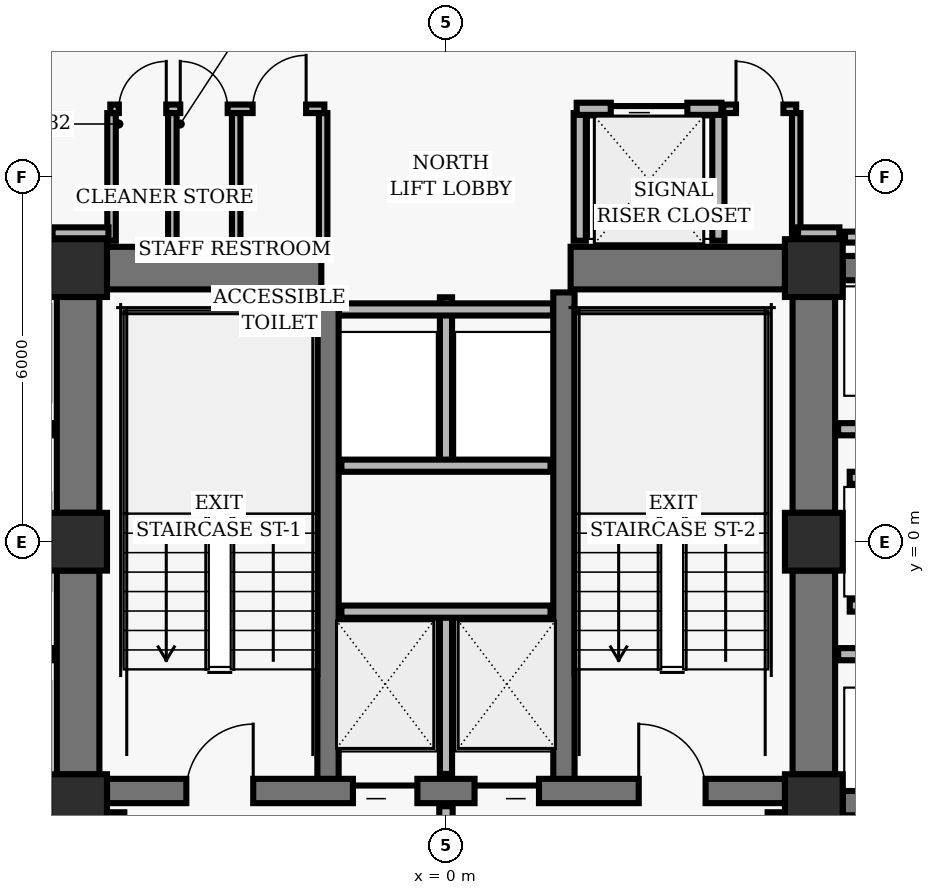
"""IFC4 building model, lengths in metres.
Left out: names, types, materials, properties, quantities, classifications, styles, units other than length and angle.
Written with IfcOpenShell. Run it as: python <this file> out.ifc"""

import sys

from ifc_helpers import new_model, si_unit, direction, frame, frame_2d, origin, origin_2d, place, context, subcontext, project, spatial, rectangle, hollow_rectangle, extrude, element, fill, save


model = new_model("IFC4")
c1 = context("Model", 3, precision=1e-05, world=origin(), true_north=direction((0.0, 1.0)))
c2 = subcontext(c1, "Body", "Model", "MODEL_VIEW")
j1 = project(units=[si_unit("LENGTHUNIT", "METRE"), si_unit("PLANEANGLEUNIT", "RADIAN")], contexts=[c1])
p1 = place(None, origin())
s1 = spatial("IfcSite", under=j1, at=p1, CompositionType="ELEMENT")
p2 = place(p1, origin())
s2 = spatial("IfcBuilding", under=s1, at=p2, CompositionType="ELEMENT")
p3 = place(p2, frame((0.0, 0.0, 88.64)))
s3 = spatial("IfcBuildingStorey", under=s2, at=p3, CompositionType="ELEMENT", Elevation=88.64)
for number, where, z_axis, x_axis in (
    (1, (-6.05, 4.5, 0.0), (0.0, 0.0, 1.0), (1.0, 0.0, 0.0)),
    (2, (6.05, 4.5, 0.0), (0.0, 0.0, 1.0), (1.0, 0.0, 0.0)),
    (3, (-6.05, 0.0, 0.0), (0.0, 0.0, 1.0), (1.0, 0.0, 0.0)),
    (4, (6.05, 0.0, 0.0), (0.0, 0.0, 1.0), (1.0, 0.0, 0.0)),
    (5, (-6.05, -4.3, 0.0), (0.0, 0.0, 1.0), (1.0, 0.0, 0.0)),
    (6, (6.05, -4.3, 0.0), (0.0, 0.0, 1.0), (1.0, 0.0, 0.0)),
):
    element("IfcColumn", number, at=place(p3, frame(where, z_axis=z_axis, x_axis=x_axis)), inside=s3, PredefinedType="COLUMN", context=c2, shape_type="SweptSolid", body=[
        extrude(hollow_rectangle(XDim=0.95, YDim=0.95, WallThickness=0.06, InnerFilletRadius=0.02, OuterFilletRadius=0.04, at=origin_2d()), origin(), (0.0, 0.0, 1.0), 3.04),
    ])
p4 = place(p3, frame((-6.05, 0.475, 0.0), z_axis=(0.0, 0.0, 1.0), x_axis=(0.0, 1.0, 0.0)))
e7 = element("IfcWall", 7, at=p4, inside=s3, PredefinedType="SHEAR", context=c2, shape_type="SweptSolid", body=[
    extrude(rectangle(XDim=3.55, YDim=0.7, at=frame_2d((1.775, 0.0))), origin(), (0.0, 0.0, 1.0), 2.788),
])
p5 = place(p3, frame((-6.05, -3.825, 0.0), z_axis=(0.0, 0.0, 1.0), x_axis=(0.0, 1.0, 0.0)))
e8 = element("IfcWall", 8, at=p5, inside=s3, PredefinedType="SHEAR", context=c2, shape_type="SweptSolid", body=[
    extrude(rectangle(XDim=3.35, YDim=0.7, at=frame_2d((1.675, 0.0))), origin(), (0.0, 0.0, 1.0), 2.788),
])
p6 = place(p3, frame((6.05, 0.475, 0.0), z_axis=(0.0, 0.0, 1.0), x_axis=(0.0, 1.0, 0.0)))
e9 = element("IfcWall", 9, at=p6, inside=s3, PredefinedType="SHEAR", context=c2, shape_type="SweptSolid", body=[
    extrude(rectangle(XDim=3.55, YDim=0.7, at=frame_2d((1.775, 0.0))), origin(), (0.0, 0.0, 1.0), 2.788),
])
p7 = place(p3, frame((6.05, -3.825, 0.0), z_axis=(0.0, 0.0, 1.0), x_axis=(0.0, 1.0, 0.0)))
e10 = element("IfcWall", 10, at=p7, inside=s3, PredefinedType="SHEAR", context=c2, shape_type="SweptSolid", body=[
    extrude(rectangle(XDim=3.35, YDim=0.7, at=frame_2d((1.675, 0.0))), origin(), (0.0, 0.0, 1.0), 2.788),
])
for number, where, z_axis, x_axis in (
    (11, (-1.94, -4.1, 0.0), (0.0, 0.0, 1.0), (0.0, 1.0, 0.0)),
    (12, (1.94, -4.1, 0.0), (0.0, 0.0, 1.0), (0.0, 1.0, 0.0)),
):
    element("IfcWall", number, at=place(p3, frame(where, z_axis=z_axis, x_axis=x_axis)), inside=s3, PredefinedType="SHEAR", context=c2, shape_type="SweptSolid", body=[
        extrude(rectangle(XDim=8.2, YDim=0.35, at=frame_2d((4.1, 0.0))), origin(), (0.0, 0.0, 1.0), 2.788),
    ])
p8 = place(p3, frame((-5.575, -4.1, 0.0), z_axis=(0.0, 0.0, 1.0), x_axis=(1.0, 0.0, 0.0)))
e13 = element("IfcWall", 13, at=p8, inside=s3, PredefinedType="SHEAR", context=c2, shape_type="SweptSolid", body=[
    extrude(rectangle(XDim=11.15, YDim=0.4, at=frame_2d((5.575, 0.0))), origin(), (0.0, 0.0, 1.0), 2.788),
])
p9 = place(p8, frame((1.305, 0.0, 0.0)))
e14 = element("IfcOpeningElement", 14, at=p9, cuts=e13, PredefinedType="OPENING", context=c2, shape_type="SweptSolid", body=[
    extrude(rectangle(XDim=1.1, YDim=2.04, at=frame_2d((0.55, 1.02))), frame((0.0, 0.21, 0.0), z_axis=(0.0, -1.0, 0.0), x_axis=(1.0, 0.0, 0.0)), (0.0, 0.0, 1.0), 0.42),
])
p10 = place(p8, frame((8.745, 0.0, 0.0)))
e15 = element("IfcOpeningElement", 15, at=p10, cuts=e13, PredefinedType="OPENING", context=c2, shape_type="SweptSolid", body=[
    extrude(rectangle(XDim=1.1, YDim=2.04, at=frame_2d((0.55, 1.02))), frame((0.0, 0.21, 0.0), z_axis=(0.0, -1.0, 0.0), x_axis=(1.0, 0.0, 0.0)), (0.0, 0.0, 1.0), 0.42),
])
p11 = place(p8, frame((4.045, 0.0, 0.0)))
e16 = element("IfcOpeningElement", 16, at=p11, cuts=e13, PredefinedType="OPENING", context=c2, shape_type="SweptSolid", body=[
    extrude(rectangle(XDim=1.06, YDim=2.04, at=frame_2d((0.53, 1.02))), frame((0.0, 0.21, 0.0), z_axis=(0.0, -1.0, 0.0), x_axis=(1.0, 0.0, 0.0)), (0.0, 0.0, 1.0), 0.42),
])
p12 = place(p8, frame((6.045, 0.0, 0.0)))
e17 = element("IfcOpeningElement", 17, at=p12, cuts=e13, PredefinedType="OPENING", context=c2, shape_type="SweptSolid", body=[
    extrude(rectangle(XDim=1.06, YDim=2.04, at=frame_2d((0.53, 1.02))), frame((0.0, 0.21, 0.0), z_axis=(0.0, -1.0, 0.0), x_axis=(1.0, 0.0, 0.0)), (0.0, 0.0, 1.0), 0.42),
])
for number, where, z_axis, x_axis in (
    (18, (-5.575, 4.5, 0.0), (0.0, 0.0, 1.0), (1.0, 0.0, 0.0)),
    (19, (2.05, 4.5, 0.0), (0.0, 0.0, 1.0), (1.0, 0.0, 0.0)),
):
    element("IfcWall", number, at=place(p3, frame(where, z_axis=z_axis, x_axis=x_axis)), inside=s3, PredefinedType="SHEAR", context=c2, shape_type="SweptSolid", body=[
        extrude(rectangle(XDim=3.525, YDim=0.7, at=frame_2d((1.762, 0.0))), origin(), (0.0, 0.0, 1.0), 2.788),
    ])
for number, where, z_axis, x_axis in (
    (20, (6.525, 4.5, 0.0), (0.0, 0.0, 1.0), (1.0, 0.0, 0.0)),
    (21, (6.525, -4.3, 0.0), (0.0, 0.0, 1.0), (1.0, 0.0, 0.0)),
):
    element("IfcWall", number, at=place(p3, frame(where, z_axis=z_axis, x_axis=x_axis)), inside=s3, PredefinedType="SHEAR", context=c2, shape_type="SweptSolid", body=[
        extrude(rectangle(XDim=1.95, YDim=0.4, at=frame_2d((0.975, 0.0))), origin(), (0.0, 0.0, 1.0), 2.788),
    ])
p13 = place(p3, frame((0.0, -3.82, 0.0), z_axis=(0.0, 0.0, 1.0), x_axis=(0.0, 1.0, 0.0)))
e22 = element("IfcWall", 22, at=p13, inside=s3, PredefinedType="PARTITIONING", context=c2, shape_type="SweptSolid", body=[
    extrude(rectangle(XDim=2.67, YDim=0.2, at=frame_2d((1.335, 0.0))), origin(), (0.0, 0.0, 1.0), 2.763),
])
p14 = place(p3, frame((-1.72, -1.15, 0.0), z_axis=(0.0, 0.0, 1.0), x_axis=(1.0, 0.0, 0.0)))
e23 = element("IfcWall", 23, at=p14, inside=s3, PredefinedType="PARTITIONING", context=c2, shape_type="SweptSolid", body=[
    extrude(rectangle(XDim=3.44, YDim=0.2, at=frame_2d((1.72, 0.0))), origin(), (0.0, 0.0, 1.0), 2.763),
])
for number, where, z_axis, x_axis in (
    (24, (-5.4, -7.16, 0.0), (0.0, 0.0, 1.0), (0.0, 1.0, 0.0)),
    (25, (5.4, -7.16, 0.0), (0.0, 0.0, 1.0), (0.0, 1.0, 0.0)),
):
    element("IfcWall", number, at=place(p3, frame(where, z_axis=z_axis, x_axis=x_axis)), inside=s3, PredefinedType="PARTITIONING", context=c2, shape_type="SweptSolid", body=[
        extrude(rectangle(XDim=2.71, YDim=0.22, at=frame_2d((1.355, 0.0))), origin(), (0.0, 0.0, 1.0), 2.763),
    ])
p15 = place(p3, frame((0.0, -7.16, 0.0), z_axis=(0.0, 0.0, 1.0), x_axis=(0.0, 1.0, 0.0)))
e26 = element("IfcWall", 26, at=p15, inside=s3, PredefinedType="PARTITIONING", context=c2, shape_type="SweptSolid", body=[
    extrude(rectangle(XDim=2.81, YDim=0.22, at=frame_2d((1.405, 0.0))), origin(), (0.0, 0.0, 1.0), 2.763),
])
p16 = place(p3, frame((0.0, 1.25, 0.0), z_axis=(0.0, 0.0, 1.0), x_axis=(0.0, 1.0, 0.0)))
e27 = element("IfcWall", 27, at=p16, inside=s3, PredefinedType="PARTITIONING", context=c2, shape_type="SweptSolid", body=[
    extrude(rectangle(XDim=2.77, YDim=0.2, at=frame_2d((1.385, 0.0))), origin(), (0.0, 0.0, 1.0), 2.763),
])
p17 = place(p3, frame((-1.72, 1.25, 0.0), z_axis=(0.0, 0.0, 1.0), x_axis=(1.0, 0.0, 0.0)))
e28 = element("IfcWall", 28, at=p17, inside=s3, PredefinedType="PARTITIONING", context=c2, shape_type="SweptSolid", body=[
    extrude(rectangle(XDim=3.44, YDim=0.2, at=frame_2d((1.72, 0.0))), origin(), (0.0, 0.0, 1.0), 2.763),
])
p18 = place(p3, frame((-1.76, 3.82, 0.0), z_axis=(0.0, 0.0, 1.0), x_axis=(1.0, 0.0, 0.0)))
e29 = element("IfcWall", 29, at=p18, inside=s3, PredefinedType="PARTITIONING", context=c2, shape_type="SweptSolid", body=[
    extrude(rectangle(XDim=3.52, YDim=0.2, at=frame_2d((1.76, 0.0))), origin(), (0.0, 0.0, 1.0), 2.763),
])
for number, where, z_axis, x_axis in (
    (30, (2.2, 4.95, 0.0), (0.0, 0.0, 1.0), (0.0, 1.0, 0.0)),
    (31, (4.48, 4.95, 0.0), (0.0, 0.0, 1.0), (0.0, 1.0, 0.0)),
):
    element("IfcWall", number, at=place(p3, frame(where, z_axis=z_axis, x_axis=x_axis)), inside=s3, PredefinedType="PARTITIONING", context=c2, shape_type="SweptSolid", body=[
        extrude(rectangle(XDim=2.1, YDim=0.2, at=frame_2d((1.05, 0.0))), origin(), (0.0, 0.0, 1.0), 2.763),
    ])
p19 = place(p3, frame((2.15, 7.12, 0.0), z_axis=(0.0, 0.0, 1.0), x_axis=(1.0, 0.0, 0.0)))
e32 = element("IfcWall", 32, at=p19, inside=s3, PredefinedType="PARTITIONING", context=c2, shape_type="SweptSolid", body=[
    extrude(rectangle(XDim=2.38, YDim=0.2, at=frame_2d((1.19, 0.0))), origin(), (0.0, 0.0, 1.0), 2.763),
])
p20 = place(p19, frame((0.56, 0.0, 0.0)))
e33 = element("IfcOpeningElement", 33, at=p20, cuts=e32, PredefinedType="OPENING", context=c2, shape_type="SweptSolid", body=[
    extrude(rectangle(XDim=1.26, YDim=2.06, at=frame_2d((0.63, 1.03))), frame((0.0, 0.11, 0.0), z_axis=(0.0, -1.0, 0.0), x_axis=(1.0, 0.0, 0.0)), (0.0, 0.0, 1.0), 0.22),
])
for number, where, z_axis, x_axis in (
    (34, (-5.5, 4.95, 0.0), (0.0, 0.0, 1.0), (0.0, 1.0, 0.0)),
    (35, (-4.5, 4.95, 0.0), (0.0, 0.0, 1.0), (0.0, 1.0, 0.0)),
    (36, (-3.45, 4.95, 0.0), (0.0, 0.0, 1.0), (0.0, 1.0, 0.0)),
    (37, (-2.02, 4.95, 0.0), (0.0, 0.0, 1.0), (0.0, 1.0, 0.0)),
):
    element("IfcWall", number, at=place(p3, frame(where, z_axis=z_axis, x_axis=x_axis)), inside=s3, PredefinedType="PARTITIONING", context=c2, shape_type="SweptSolid", body=[
        extrude(rectangle(XDim=2.1, YDim=0.14, at=frame_2d((1.05, 0.0))), origin(), (0.0, 0.0, 1.0), 2.763),
    ])
p21 = place(p3, frame((-5.52, 7.12, 0.0), z_axis=(0.0, 0.0, 1.0), x_axis=(1.0, 0.0, 0.0)))
e38 = element("IfcWall", 38, at=p21, inside=s3, PredefinedType="PARTITIONING", context=c2, shape_type="SweptSolid", body=[
    extrude(rectangle(XDim=3.52, YDim=0.14, at=frame_2d((1.76, 0.0))), origin(), (0.0, 0.0, 1.0), 2.763),
])
p22 = place(p21, frame((0.14, 0.0, 0.0)))
e39 = element("IfcOpeningElement", 39, at=p22, cuts=e38, PredefinedType="OPENING", context=c2, shape_type="SweptSolid", body=[
    extrude(rectangle(XDim=0.78, YDim=2.01, at=frame_2d((0.39, 1.005))), frame((0.0, 0.08, 0.0), z_axis=(0.0, -1.0, 0.0), x_axis=(1.0, 0.0, 0.0)), (0.0, 0.0, 1.0), 0.16),
])
p23 = place(p21, frame((1.15, 0.0, 0.0)))
e40 = element("IfcOpeningElement", 40, at=p23, cuts=e38, PredefinedType="OPENING", context=c2, shape_type="SweptSolid", body=[
    extrude(rectangle(XDim=0.78, YDim=2.01, at=frame_2d((0.39, 1.005))), frame((0.0, 0.08, 0.0), z_axis=(0.0, -1.0, 0.0), x_axis=(1.0, 0.0, 0.0)), (0.0, 0.0, 1.0), 0.16),
])
p24 = place(p21, frame((2.34, 0.0, 0.0)))
e41 = element("IfcOpeningElement", 41, at=p24, cuts=e38, PredefinedType="OPENING", context=c2, shape_type="SweptSolid", body=[
    extrude(rectangle(XDim=0.88, YDim=2.02, at=frame_2d((0.44, 1.01))), frame((0.0, 0.08, 0.0), z_axis=(0.0, -1.0, 0.0), x_axis=(1.0, 0.0, 0.0)), (0.0, 0.0, 1.0), 0.16),
])
p25 = place(p3, frame((5.76, 4.95, 0.0), z_axis=(0.0, 0.0, 1.0), x_axis=(0.0, 1.0, 0.0)))
e42 = element("IfcWall", 42, at=p25, inside=s3, PredefinedType="PARTITIONING", context=c2, shape_type="SweptSolid", body=[
    extrude(rectangle(XDim=2.1, YDim=0.14, at=frame_2d((1.05, 0.0))), origin(), (0.0, 0.0, 1.0), 2.763),
])
p26 = place(p3, frame((4.56, 7.12, 0.0), z_axis=(0.0, 0.0, 1.0), x_axis=(1.0, 0.0, 0.0)))
e43 = element("IfcWall", 43, at=p26, inside=s3, PredefinedType="PARTITIONING", context=c2, shape_type="SweptSolid", body=[
    extrude(rectangle(XDim=1.2, YDim=0.14, at=frame_2d((0.6, 0.0))), origin(), (0.0, 0.0, 1.0), 2.763),
])
p27 = place(p26, frame((0.21, 0.0, 0.0)))
e44 = element("IfcOpeningElement", 44, at=p27, cuts=e43, PredefinedType="OPENING", context=c2, shape_type="SweptSolid", body=[
    extrude(rectangle(XDim=0.78, YDim=2.01, at=frame_2d((0.39, 1.005))), frame((0.0, 0.08, 0.0), z_axis=(0.0, -1.0, 0.0), x_axis=(1.0, 0.0, 0.0)), (0.0, 0.0, 1.0), 0.16),
])
for number, where, z_axis, x_axis in (
    (45, (-8.55, -1.85, 0.0), (0.0, 0.0, 1.0), (1.0, 0.0, 0.0)),
    (46, (-8.55, 1.85, 0.0), (0.0, 0.0, 1.0), (1.0, 0.0, 0.0)),
    (47, (6.45, -1.85, 0.0), (0.0, 0.0, 1.0), (1.0, 0.0, 0.0)),
    (48, (6.45, 1.85, 0.0), (0.0, 0.0, 1.0), (1.0, 0.0, 0.0)),
):
    element("IfcWall", number, at=place(p3, frame(where, z_axis=z_axis, x_axis=x_axis)), inside=s3, PredefinedType="PARTITIONING", context=c2, shape_type="SweptSolid", body=[
        extrude(rectangle(XDim=2.1, YDim=0.2, at=frame_2d((1.05, 0.0))), origin(), (0.0, 0.0, 1.0), 2.763),
    ])
for number, where, z_axis, x_axis in (
    (49, (6.64, -1.05, 0.0), (0.0, 0.0, 1.0), (1.0, 0.0, 0.0)),
    (50, (6.64, 1.05, 0.0), (0.0, 0.0, 1.0), (1.0, 0.0, 0.0)),
):
    element("IfcWall", number, at=place(p3, frame(where, z_axis=z_axis, x_axis=x_axis)), inside=s3, PredefinedType="PARTITIONING", context=c2, shape_type="SweptSolid", body=[
        extrude(rectangle(XDim=1.91, YDim=0.2, at=frame_2d((0.955, 0.0))), origin(), (0.0, 0.0, 1.0), 2.763),
    ])
p28 = place(p3, frame((9.37, 5.01, 0.0), z_axis=(0.0, 0.0, 1.0), x_axis=(-1.0, 0.0, 0.0)))
e51 = element("IfcWall", 51, at=p28, inside=s3, PredefinedType="PARTITIONING", context=c2, shape_type="SweptSolid", body=[
    extrude(rectangle(XDim=2.808, YDim=0.18, at=frame_2d((1.404, 0.0))), origin(), (0.0, 0.0, 1.0), 2.763),
])
p29 = place(p3, frame((6.47, 5.08, 0.0), z_axis=(0.0, 0.0, 1.0), x_axis=(-1.0, 0.0, 0.0)))
e52 = element("IfcWall", 52, at=p29, inside=s3, PredefinedType="PARTITIONING", context=c2, shape_type="SweptSolid", body=[
    extrude(rectangle(XDim=0.68, YDim=0.18, at=frame_2d((0.34, 0.0))), origin(), (0.0, 0.0, 1.0), 2.763),
])
p30 = place(p3, frame((-5.55, 5.08, 0.0), z_axis=(0.0, 0.0, 1.0), x_axis=(-1.0, 0.0, 0.0)))
e53 = element("IfcWall", 53, at=p30, inside=s3, PredefinedType="PARTITIONING", context=c2, shape_type="SweptSolid", body=[
    extrude(rectangle(XDim=0.92, YDim=0.18, at=frame_2d((0.46, 0.0))), origin(), (0.0, 0.0, 1.0), 2.763),
])
p31 = place(p9, origin())
e54 = element("IfcDoor", 54, at=p31, inside=s3, OperationType="SINGLE_SWING_RIGHT", PredefinedType="DOOR", context=c2, shape_type="SweptSolid", body=[
    extrude(rectangle(XDim=1.1, YDim=2.04, at=frame_2d((0.55, 1.02))), frame((0.0, 0.025, 0.0), z_axis=(0.0, -1.0, 0.0), x_axis=(1.0, 0.0, 0.0)), (0.0, 0.0, 1.0), 0.05),
])
fill(e14, e54)
p32 = place(p10, origin())
e55 = element("IfcDoor", 55, at=p32, inside=s3, OperationType="SINGLE_SWING_LEFT", PredefinedType="DOOR", context=c2, shape_type="SweptSolid", body=[
    extrude(rectangle(XDim=1.1, YDim=2.04, at=frame_2d((0.55, 1.02))), frame((0.0, 0.025, 0.0), z_axis=(0.0, -1.0, 0.0), x_axis=(1.0, 0.0, 0.0)), (0.0, 0.0, 1.0), 0.05),
])
fill(e15, e55)
p33 = place(p11, origin())
e56 = element("IfcDoor", 56, at=p33, inside=s3, OperationType="SLIDING_TO_LEFT", PredefinedType="DOOR", context=c2, shape_type="SweptSolid", body=[
    extrude(rectangle(XDim=1.06, YDim=2.04, at=frame_2d((0.53, 1.02))), frame((0.0, 0.025, 0.0), z_axis=(0.0, -1.0, 0.0), x_axis=(1.0, 0.0, 0.0)), (0.0, 0.0, 1.0), 0.05),
])
fill(e16, e56)
p34 = place(p12, origin())
e57 = element("IfcDoor", 57, at=p34, inside=s3, OperationType="SLIDING_TO_RIGHT", PredefinedType="DOOR", context=c2, shape_type="SweptSolid", body=[
    extrude(rectangle(XDim=1.06, YDim=2.04, at=frame_2d((0.53, 1.02))), frame((0.0, 0.025, 0.0), z_axis=(0.0, -1.0, 0.0), x_axis=(1.0, 0.0, 0.0)), (0.0, 0.0, 1.0), 0.05),
])
fill(e17, e57)
p35 = place(p20, origin())
e58 = element("IfcDoor", 58, at=p35, inside=s3, OperationType="SLIDING_TO_LEFT", PredefinedType="DOOR", context=c2, shape_type="SweptSolid", body=[
    extrude(rectangle(XDim=1.26, YDim=2.06, at=frame_2d((0.63, 1.03))), frame((0.0, 0.025, 0.0), z_axis=(0.0, -1.0, 0.0), x_axis=(1.0, 0.0, 0.0)), (0.0, 0.0, 1.0), 0.05),
])
fill(e33, e58)
p36 = place(p22, origin())
e59 = element("IfcDoor", 59, at=p36, inside=s3, OperationType="SINGLE_SWING_RIGHT", PredefinedType="DOOR", context=c2, shape_type="SweptSolid", body=[
    extrude(rectangle(XDim=0.78, YDim=2.01, at=frame_2d((0.39, 1.005))), frame((0.0, 0.025, 0.0), z_axis=(0.0, -1.0, 0.0), x_axis=(1.0, 0.0, 0.0)), (0.0, 0.0, 1.0), 0.05),
])
fill(e39, e59)
p37 = place(p23, origin())
e60 = element("IfcDoor", 60, at=p37, inside=s3, OperationType="SINGLE_SWING_LEFT", PredefinedType="DOOR", context=c2, shape_type="SweptSolid", body=[
    extrude(rectangle(XDim=0.78, YDim=2.01, at=frame_2d((0.39, 1.005))), frame((0.0, 0.025, 0.0), z_axis=(0.0, -1.0, 0.0), x_axis=(1.0, 0.0, 0.0)), (0.0, 0.0, 1.0), 0.05),
])
fill(e40, e60)
p38 = place(p24, origin())
e61 = element("IfcDoor", 61, at=p38, inside=s3, OperationType="SINGLE_SWING_RIGHT", PredefinedType="DOOR", context=c2, shape_type="SweptSolid", body=[
    extrude(rectangle(XDim=0.88, YDim=2.02, at=frame_2d((0.44, 1.01))), frame((0.0, 0.025, 0.0), z_axis=(0.0, -1.0, 0.0), x_axis=(1.0, 0.0, 0.0)), (0.0, 0.0, 1.0), 0.05),
])
fill(e41, e61)
p39 = place(p27, origin())
e62 = element("IfcDoor", 62, at=p39, inside=s3, OperationType="SINGLE_SWING_LEFT", PredefinedType="DOOR", context=c2, shape_type="SweptSolid", body=[
    extrude(rectangle(XDim=0.78, YDim=2.01, at=frame_2d((0.39, 1.005))), frame((0.0, 0.025, 0.0), z_axis=(0.0, -1.0, 0.0), x_axis=(1.0, 0.0, 0.0)), (0.0, 0.0, 1.0), 0.05),
])
fill(e44, e62)
save(model, sys.argv[1])
